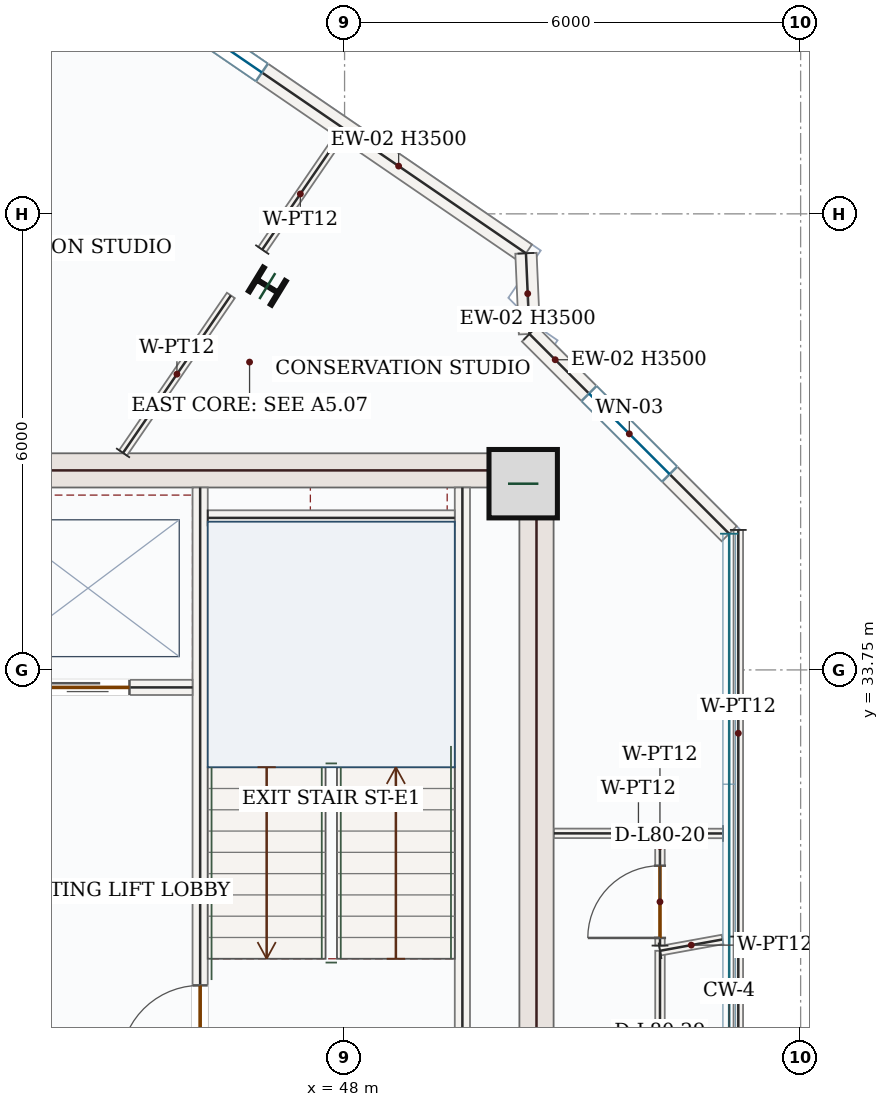
"""IFC4 building model, lengths in metres.
Left out: names, types, materials, properties, quantities, classifications, styles, units other than length and angle.
Written with IfcOpenShell. Run it as: python <this file> out.ifc"""

import sys

from ifc_helpers import new_model, si_unit, direction, frame, frame_2d, origin, origin_2d, place, context, subcontext, project, spatial, rectangle, i_section, extrude, source, transform, mapped, element, fill, save


model = new_model("IFC4")
c1 = context("Model", 3, precision=1e-05, world=origin(), true_north=direction((0.0, 1.0)))
c2 = subcontext(c1, "Body", "Model", "MODEL_VIEW")
j1 = project(units=[si_unit("LENGTHUNIT", "METRE"), si_unit("PLANEANGLEUNIT", "RADIAN")], contexts=[c1])
p1 = place(None, origin())
s1 = spatial("IfcSite", under=j1, at=p1, CompositionType="ELEMENT")
p2 = place(p1, origin())
s2 = spatial("IfcBuilding", under=s1, at=p2, CompositionType="ELEMENT")
p3 = place(p2, frame((0.0, 0.0, 331.05)))
s3 = spatial("IfcBuildingStorey", under=s2, at=p3, CompositionType="ELEMENT", Elevation=331.05)
m1 = source(origin(), c2, "Body", "SweptSolid", [
    extrude(rectangle(XDim=8.55, YDim=0.45, at=frame_2d((4.275, 0.0))), origin(), (0.0, 0.0, 1.0), 3.5),
])
p4 = place(p3, frame((50.525, 28.05, 0.0), z_axis=(0.0, 0.0, 1.0), x_axis=(0.0, 1.0, 0.0)))
e1 = element("IfcWall", 1, at=p4, inside=s3, PredefinedType="SHEAR", context=c2, shape_type="MappedRepresentation", body=[
    mapped(m1, transform((0.0, 0.0, 0.0), x_axis=(1.0, 0.0, 0.0), y_axis=(0.0, 1.0, 0.0), z_axis=(0.0, 0.0, 1.0), scale=1.0)),
])
m2 = source(origin(), c2, "Body", "SweptSolid", [
    extrude(rectangle(XDim=7.1, YDim=0.45, at=frame_2d((3.55, 0.0))), origin(), (0.0, 0.0, 1.0), 3.5),
])
p5 = place(p3, frame((43.2, 36.375, 0.0), z_axis=(0.0, 0.0, 1.0), x_axis=(1.0, 0.0, 0.0)))
e2 = element("IfcWall", 2, at=p5, inside=s3, PredefinedType="SHEAR", context=c2, shape_type="MappedRepresentation", body=[
    mapped(m2, transform((0.0, 0.0, 0.0), x_axis=(1.0, 0.0, 0.0), y_axis=(0.0, 1.0, 0.0), z_axis=(0.0, 0.0, 1.0), scale=1.0)),
])
m3 = source(origin(), c2, "Body", "SweptSolid", [
    extrude(rectangle(XDim=0.9, YDim=0.9, at=origin_2d()), origin(), (0.0, 0.0, 1.0), 3.75),
])
p6 = place(p3, frame((50.35, 36.2, 0.0), z_axis=(0.0, 0.0, 1.0), x_axis=(1.0, 0.0, 0.0)))
e3 = element("IfcColumn", 3, at=p6, inside=s3, PredefinedType="COLUMN", context=c2, shape_type="MappedRepresentation", body=[
    mapped(m3, transform((0.0, 0.0, 0.0), x_axis=(1.0, 0.0, 0.0), y_axis=(0.0, 1.0, 0.0), z_axis=(0.0, 0.0, 1.0), scale=1.0)),
])
m4 = source(origin(), c2, "Body", "SweptSolid", [
    extrude(i_section(OverallWidth=0.369, OverallDepth=0.356, WebThickness=0.011, FlangeThickness=0.018, FilletRadius=0.018, at=origin_2d()), origin(), (0.0, 0.0, 1.0), 3.75),
])
p7 = place(p3, frame((46.984, 38.8, 0.0), z_axis=(0.0, 0.0, 1.0), x_axis=(0.522498564716, 0.852640164354, 0.0)))
e4 = element("IfcColumn", 4, at=p7, inside=s3, PredefinedType="COLUMN", context=c2, shape_type="MappedRepresentation", body=[
    mapped(m4, transform((0.0, 0.0, 0.0), x_axis=(1.0, 0.0, 0.0), y_axis=(0.0, 1.0, 0.0), z_axis=(0.0, 0.0, 1.0), scale=1.0)),
])
p8 = place(p3, frame((42.201, 44.836, 0.0), z_axis=(0.0, 0.0, 1.0), x_axis=(0.825121888295, -0.56495474992, 0.0)))
e5 = element("IfcWall", 5, at=p8, inside=s3, PredefinedType="SOLIDWALL", context=c2, shape_type="SweptSolid", body=[
    extrude(rectangle(XDim=9.92, YDim=0.28, at=frame_2d((4.96, 0.0))), origin(), (0.0, 0.0, 1.0), 3.5),
])
p9 = place(p8, frame((4.21, 0.0, 0.85)))
e6 = element("IfcOpeningElement", 6, at=p9, cuts=e5, PredefinedType="OPENING", context=c2, shape_type="SweptSolid", body=[
    extrude(rectangle(XDim=1.5, YDim=1.5, at=frame_2d((0.75, 0.75))), frame((0.0, 0.15, 0.0), z_axis=(0.0, -1.0, 0.0), x_axis=(1.0, 0.0, 0.0)), (0.0, 0.0, 1.0), 0.3),
])
m5 = source(origin(), c2, "Body", "SweptSolid", [
    extrude(rectangle(XDim=1.063, YDim=0.28, at=frame_2d((0.531, 0.0))), origin(), (0.0, 0.0, 1.0), 3.5),
])
p10 = place(p3, frame((50.386, 39.231, 0.0), z_axis=(0.0, 0.0, 1.0), x_axis=(0.043417286211, -0.999057025028, 0.0)))
e7 = element("IfcWall", 7, at=p10, inside=s3, PredefinedType="SOLIDWALL", context=c2, shape_type="MappedRepresentation", body=[
    mapped(m5, transform((0.0, 0.0, 0.0), x_axis=(1.0, 0.0, 0.0), y_axis=(0.0, 1.0, 0.0), z_axis=(0.0, 0.0, 1.0), scale=1.0)),
])
p11 = place(p3, frame((50.432, 38.17, 0.0), z_axis=(0.0, 0.0, 1.0), x_axis=(0.707106781187, -0.707106781187, 0.0)))
e8 = element("IfcWall", 8, at=p11, inside=s3, PredefinedType="SOLIDWALL", context=c2, shape_type="SweptSolid", body=[
    extrude(rectangle(XDim=3.716, YDim=0.28, at=frame_2d((1.858, 0.0))), origin(), (0.0, 0.0, 1.0), 3.5),
])
p12 = place(p11, frame((1.108, 0.0, 0.85)))
e9 = element("IfcOpeningElement", 9, at=p12, cuts=e8, PredefinedType="OPENING", context=c2, shape_type="SweptSolid", body=[
    extrude(rectangle(XDim=1.5, YDim=1.5, at=frame_2d((0.75, 0.75))), frame((0.0, 0.15, 0.0), z_axis=(0.0, -1.0, 0.0), x_axis=(1.0, 0.0, 0.0)), (0.0, 0.0, 1.0), 0.3),
])
m6 = source(origin(), c2, "Body", "SweptSolid", [
    extrude(rectangle(XDim=7.87, YDim=0.2, at=frame_2d((3.935, 0.0))), origin(), (0.0, 0.0, 1.0), 3.5),
])
p13 = place(p3, frame((49.55, 28.28, 0.0), z_axis=(0.0, 0.0, 1.0), x_axis=(0.0, 1.0, 0.0)))
e10 = element("IfcWall", 10, at=p13, inside=s3, PredefinedType="SOLIDWALL", context=c2, shape_type="MappedRepresentation", body=[
    mapped(m6, transform((0.0, 0.0, 0.0), x_axis=(1.0, 0.0, 0.0), y_axis=(0.0, 1.0, 0.0), z_axis=(0.0, 0.0, 1.0), scale=1.0)),
])
p14 = place(p3, frame((46.1, 28.15, 0.0), z_axis=(0.0, 0.0, 1.0), x_axis=(0.0, 1.0, 0.0)))
e11 = element("IfcWall", 11, at=p14, inside=s3, PredefinedType="SOLIDWALL", context=c2, shape_type="SweptSolid", body=[
    extrude(rectangle(XDim=8.0, YDim=0.2, at=frame_2d((4.0, 0.0))), origin(), (0.0, 0.0, 1.0), 3.5),
])
p15 = place(p14, frame((0.4, 0.0, 0.0)))
e12 = element("IfcOpeningElement", 12, at=p15, cuts=e11, PredefinedType="OPENING", context=c2, shape_type="SweptSolid", body=[
    extrude(rectangle(XDim=1.05, YDim=2.15, at=frame_2d((0.525, 1.075))), frame((0.0, 0.11, 0.0), z_axis=(0.0, -1.0, 0.0), x_axis=(1.0, 0.0, 0.0)), (0.0, 0.0, 1.0), 0.22),
])
m7 = source(origin(), c2, "Body", "SweptSolid", [
    extrude(rectangle(XDim=3.25, YDim=0.2, at=frame_2d((1.625, 0.0))), origin(), (0.0, 0.0, 1.0), 3.5),
])
p16 = place(p3, frame((46.2, 35.75, 0.0), z_axis=(0.0, 0.0, 1.0), x_axis=(1.0, 0.0, 0.0)))
e13 = element("IfcWall", 13, at=p16, inside=s3, PredefinedType="SOLIDWALL", context=c2, shape_type="MappedRepresentation", body=[
    mapped(m7, transform((0.0, 0.0, 0.0), x_axis=(1.0, 0.0, 0.0), y_axis=(0.0, 1.0, 0.0), z_axis=(0.0, 0.0, 1.0), scale=1.0)),
])
p17 = place(p3, frame((43.25, 33.52, 0.0), z_axis=(0.0, 0.0, 1.0), x_axis=(1.0, 0.0, 0.0)))
e14 = element("IfcWall", 14, at=p17, inside=s3, PredefinedType="SOLIDWALL", context=c2, shape_type="SweptSolid", body=[
    extrude(rectangle(XDim=2.75, YDim=0.2, at=frame_2d((1.375, 0.0))), origin(), (0.0, 0.0, 1.0), 3.5),
])
p18 = place(p17, frame((0.82, 0.0, 0.0)))
e15 = element("IfcOpeningElement", 15, at=p18, cuts=e14, PredefinedType="OPENING", context=c2, shape_type="SweptSolid", body=[
    extrude(rectangle(XDim=1.1, YDim=2.15, at=frame_2d((0.55, 1.075))), frame((0.0, 0.11, 0.0), z_axis=(0.0, -1.0, 0.0), x_axis=(1.0, 0.0, 0.0)), (0.0, 0.0, 1.0), 0.22),
])
p19 = place(p3, frame((52.147, 22.47, 0.0), z_axis=(0.0, 0.0, 1.0), x_axis=(0.000321874581, 0.999999948198, 0.0)))
e16 = element("IfcWall", 16, at=p19, inside=s3, PredefinedType="PARTITIONING", context=c2, shape_type="SweptSolid", body=[
    extrude(rectangle(XDim=7.585, YDim=0.125, at=frame_2d((3.792, 0.0))), origin(), (0.0, 0.0, 1.0), 3.5),
])
p20 = place(p19, frame((5.175, 0.0, 0.0)))
e17 = element("IfcOpeningElement", 17, at=p20, cuts=e16, PredefinedType="OPENING", context=c2, shape_type="SweptSolid", body=[
    extrude(rectangle(XDim=0.95, YDim=2.15, at=frame_2d((0.475, 1.075))), frame((0.0, 0.073, 0.0), z_axis=(0.0, -1.0, 0.0), x_axis=(1.0, 0.0, 0.0)), (0.0, 0.0, 1.0), 0.145),
])
m8 = source(origin(), c2, "Body", "SweptSolid", [
    extrude(rectangle(XDim=0.836, YDim=0.125, at=frame_2d((0.418, 0.0))), origin(), (0.0, 0.0, 1.0), 3.5),
])
p21 = place(p3, frame((52.15, 30.055, 0.0), z_axis=(0.0, 0.0, 1.0), x_axis=(0.983949253333, 0.178448499195, 0.0)))
e18 = element("IfcWall", 18, at=p21, inside=s3, PredefinedType="PARTITIONING", context=c2, shape_type="MappedRepresentation", body=[
    mapped(m8, transform((0.0, 0.0, 0.0), x_axis=(1.0, 0.0, 0.0), y_axis=(0.0, 1.0, 0.0), z_axis=(0.0, 0.0, 1.0), scale=1.0)),
])
m9 = source(origin(), c2, "Body", "SweptSolid", [
    extrude(rectangle(XDim=6.777, YDim=0.125, at=frame_2d((3.388, 0.0))), origin(), (0.0, 0.0, 1.0), 3.5),
])
p22 = place(p3, frame((53.18, 30.242, 0.0), z_axis=(0.0, 0.0, 1.0), x_axis=(7.2053896e-05, -0.999999997404, 0.0)))
e19 = element("IfcWall", 19, at=p22, inside=s3, PredefinedType="PARTITIONING", context=c2, shape_type="MappedRepresentation", body=[
    mapped(m9, transform((0.0, 0.0, 0.0), x_axis=(1.0, 0.0, 0.0), y_axis=(0.0, 1.0, 0.0), z_axis=(0.0, 0.0, 1.0), scale=1.0)),
])
m10 = source(origin(), c2, "Body", "SweptSolid", [
    extrude(rectangle(XDim=2.223, YDim=0.125, at=frame_2d((1.111, 0.0))), origin(), (0.0, 0.0, 1.0), 3.5),
])
p23 = place(p3, frame((52.978, 31.598, 0.0), z_axis=(0.0, 0.0, 1.0), x_axis=(-0.999999704402, 0.000768892567, 0.0)))
e20 = element("IfcWall", 20, at=p23, inside=s3, PredefinedType="PARTITIONING", context=c2, shape_type="MappedRepresentation", body=[
    mapped(m10, transform((0.0, 0.0, 0.0), x_axis=(1.0, 0.0, 0.0), y_axis=(0.0, 1.0, 0.0), z_axis=(0.0, 0.0, 1.0), scale=1.0)),
])
m11 = source(origin(), c2, "Body", "SweptSolid", [
    extrude(rectangle(XDim=2.511, YDim=0.125, at=frame_2d((1.255, 0.0))), origin(), (0.0, 0.0, 1.0), 3.5),
])
p24 = place(p3, frame((45.085, 36.605, 0.0), z_axis=(0.0, 0.0, 1.0), x_axis=(0.564980194272, 0.825104466162, 0.0)))
e21 = element("IfcWall", 21, at=p24, inside=s3, PredefinedType="PARTITIONING", context=c2, shape_type="MappedRepresentation", body=[
    mapped(m11, transform((0.0, 0.0, 0.0), x_axis=(1.0, 0.0, 0.0), y_axis=(0.0, 1.0, 0.0), z_axis=(0.0, 0.0, 1.0), scale=1.0)),
])
m12 = source(origin(), c2, "Body", "SweptSolid", [
    extrude(rectangle(XDim=1.775, YDim=0.125, at=frame_2d((0.888, 0.0))), origin(), (0.0, 0.0, 1.0), 3.5),
])
p25 = place(p3, frame((46.917, 39.28, 0.0), z_axis=(0.0, 0.0, 1.0), x_axis=(0.56509798207, 0.825023800057, 0.0)))
e22 = element("IfcWall", 22, at=p25, inside=s3, PredefinedType="PARTITIONING", context=c2, shape_type="MappedRepresentation", body=[
    mapped(m12, transform((0.0, 0.0, 0.0), x_axis=(1.0, 0.0, 0.0), y_axis=(0.0, 1.0, 0.0), z_axis=(0.0, 0.0, 1.0), scale=1.0)),
])
m13 = source(origin(), c2, "Body", "SweptSolid", [
    extrude(rectangle(XDim=5.35, YDim=0.125, at=frame_2d((2.675, 0.0))), origin(), (0.0, 0.0, 1.0), 3.5),
])
p26 = place(p3, frame((53.18, 35.592, 0.0), z_axis=(0.0, 0.0, 1.0), x_axis=(0.0, -1.0, 0.0)))
e23 = element("IfcWall", 23, at=p26, inside=s3, PredefinedType="PARTITIONING", context=c2, shape_type="MappedRepresentation", body=[
    mapped(m13, transform((0.0, 0.0, 0.0), x_axis=(1.0, 0.0, 0.0), y_axis=(0.0, 1.0, 0.0), z_axis=(0.0, 0.0, 1.0), scale=1.0)),
])
p27 = place(p3, frame((52.15, 30.124, 0.0), z_axis=(0.0, 0.0, 1.0), x_axis=(-0.000520201074, 0.999999864695, 0.0)))
e24 = element("IfcWall", 24, at=p27, inside=s3, PredefinedType="PARTITIONING", context=c2, shape_type="SweptSolid", body=[
    extrude(rectangle(XDim=1.408, YDim=0.125, at=frame_2d((0.704, 0.0))), origin(), (0.0, 0.0, 1.0), 3.5),
])
p28 = place(p27, frame((0.101, 0.0, 0.0)))
e25 = element("IfcOpeningElement", 25, at=p28, cuts=e24, PredefinedType="OPENING", context=c2, shape_type="SweptSolid", body=[
    extrude(rectangle(XDim=0.95, YDim=2.15, at=frame_2d((0.475, 1.075))), frame((0.0, 0.073, 0.0), z_axis=(0.0, -1.0, 0.0), x_axis=(1.0, 0.0, 0.0)), (0.0, 0.0, 1.0), 0.145),
])
m14 = source(origin(), c2, "Body", "SweptSolid", [
    extrude(rectangle(XDim=1.5, YDim=1.5, at=frame_2d((0.75, 0.75))), frame((0.0, 0.03, 0.0), z_axis=(0.0, -1.0, 0.0), x_axis=(1.0, 0.0, 0.0)), (0.0, 0.0, 1.0), 0.06),
])
p29 = place(p9, origin())
e26 = element("IfcWindow", 26, at=p29, inside=s3, PartitioningType="SINGLE_PANEL", PredefinedType="WINDOW", context=c2, shape_type="MappedRepresentation", body=[
    mapped(m14, transform((0.0, 0.0, 0.0), x_axis=(1.0, 0.0, 0.0), y_axis=(0.0, 1.0, 0.0), z_axis=(0.0, 0.0, 1.0), scale=1.0)),
])
fill(e6, e26)
p30 = place(p12, origin())
e27 = element("IfcWindow", 27, at=p30, inside=s3, PartitioningType="SINGLE_PANEL", PredefinedType="WINDOW", context=c2, shape_type="MappedRepresentation", body=[
    mapped(m14, transform((0.0, 0.0, 0.0), x_axis=(1.0, 0.0, 0.0), y_axis=(0.0, 1.0, 0.0), z_axis=(0.0, 0.0, 1.0), scale=1.0)),
])
fill(e9, e27)
m15 = source(origin(), c2, "Body", "SweptSolid", [
    extrude(rectangle(XDim=1.05, YDim=2.15, at=frame_2d((0.525, 1.075))), frame((0.0, 0.025, 0.0), z_axis=(0.0, -1.0, 0.0), x_axis=(1.0, 0.0, 0.0)), (0.0, 0.0, 1.0), 0.05),
])
p31 = place(p15, origin())
e28 = element("IfcDoor", 28, at=p31, inside=s3, OperationType="SINGLE_SWING_LEFT", PredefinedType="DOOR", context=c2, shape_type="MappedRepresentation", body=[
    mapped(m15, transform((0.0, 0.0, 0.0), x_axis=(1.0, 0.0, 0.0), y_axis=(0.0, 1.0, 0.0), z_axis=(0.0, 0.0, 1.0), scale=1.0)),
])
fill(e12, e28)
m16 = source(origin(), c2, "Body", "SweptSolid", [
    extrude(rectangle(XDim=1.1, YDim=2.15, at=frame_2d((0.55, 1.075))), frame((0.0, 0.025, 0.0), z_axis=(0.0, -1.0, 0.0), x_axis=(1.0, 0.0, 0.0)), (0.0, 0.0, 1.0), 0.05),
])
p32 = place(p18, origin())
e29 = element("IfcDoor", 29, at=p32, inside=s3, OperationType="DOUBLE_DOOR_SLIDING", PredefinedType="DOOR", context=c2, shape_type="MappedRepresentation", body=[
    mapped(m16, transform((0.0, 0.0, 0.0), x_axis=(1.0, 0.0, 0.0), y_axis=(0.0, 1.0, 0.0), z_axis=(0.0, 0.0, 1.0), scale=1.0)),
])
fill(e15, e29)
m17 = source(origin(), c2, "Body", "SweptSolid", [
    extrude(rectangle(XDim=0.95, YDim=2.15, at=frame_2d((0.475, 1.075))), frame((0.0, 0.025, 0.0), z_axis=(0.0, -1.0, 0.0), x_axis=(1.0, 0.0, 0.0)), (0.0, 0.0, 1.0), 0.05),
])
p33 = place(p28, origin())
e30 = element("IfcDoor", 30, at=p33, inside=s3, OperationType="SINGLE_SWING_LEFT", PredefinedType="DOOR", context=c2, shape_type="MappedRepresentation", body=[
    mapped(m17, transform((0.0, 0.0, 0.0), x_axis=(1.0, 0.0, 0.0), y_axis=(0.0, 1.0, 0.0), z_axis=(0.0, 0.0, 1.0), scale=1.0)),
])
fill(e25, e30)
save(model, sys.argv[1])
